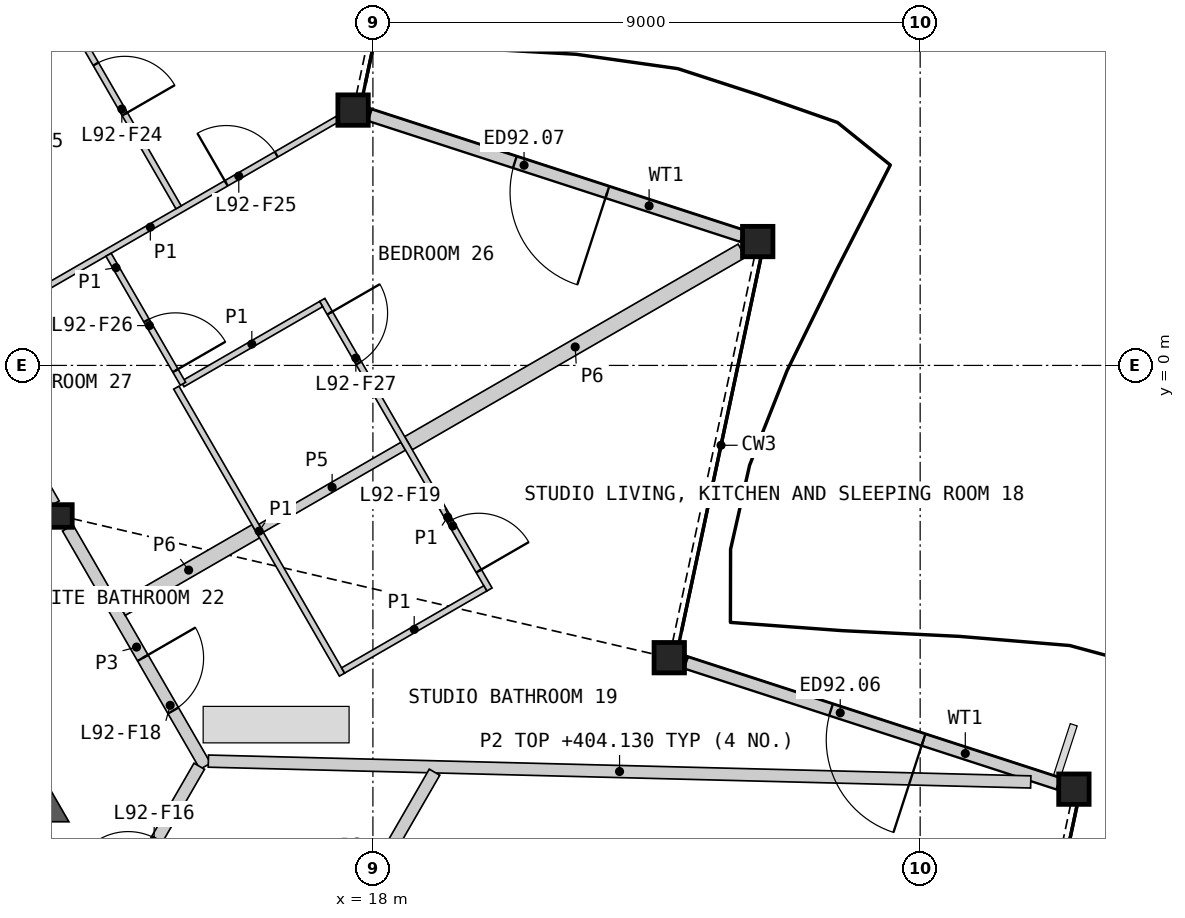
"""IFC4 building model, lengths in metres.
Left out: names, types, materials, properties, quantities, classifications, styles, units other than length and angle.
Written with IfcOpenShell. Run it as: python <this file> out.ifc"""

import sys

from ifc_helpers import new_model, si_unit, direction, frame, frame_2d, origin, origin_2d, place, context, subcontext, project, spatial, polyline, rectangle, hollow_rectangle, i_section, outline, extrude, element, fill, save


model = new_model("IFC4")
c1 = context("Model", 3, precision=1e-05, world=origin(), true_north=direction((0.0, 1.0)))
c2 = subcontext(c1, "Body", "Model", "MODEL_VIEW")
j1 = project(units=[si_unit("LENGTHUNIT", "METRE"), si_unit("PLANEANGLEUNIT", "RADIAN")], contexts=[c1])
p1 = place(None, origin())
s1 = spatial("IfcSite", under=j1, at=p1, CompositionType="ELEMENT")
p2 = place(p1, origin())
s2 = spatial("IfcBuilding", under=s1, at=p2, CompositionType="ELEMENT")
p3 = place(p2, frame((0.0, 0.0, 401.8)))
s3 = spatial("IfcBuildingStorey", under=s2, at=p3, CompositionType="ELEMENT", Elevation=401.8)
for number, where, z_axis, x_axis in (
    (1, (29.529, -6.969, 0.0), (0.0, 0.0, 1.0), (1.0, 0.0, 0.0)),
    (2, (22.874, -4.807, 0.0), (0.0, 0.0, 1.0), (1.0, 0.0, 0.0)),
    (3, (24.329, 2.037, 0.0), (0.0, 0.0, 1.0), (1.0, 0.0, 0.0)),
    (4, (17.674, 4.199, 0.0), (0.0, 0.0, 1.0), (1.0, 0.0, 0.0)),
):
    element("IfcColumn", number, at=place(p3, frame(where, z_axis=z_axis, x_axis=x_axis)), inside=s3, PredefinedType="COLUMN", context=c2, shape_type="SweptSolid", body=[
        extrude(hollow_rectangle(XDim=0.5, YDim=0.5, WallThickness=0.03, at=origin_2d()), origin(), (0.0, 0.0, 1.0), 3.4),
    ])
p4 = place(p3, frame((12.868, -2.476, 0.0), z_axis=(0.0, 0.0, 1.0), x_axis=(1.0, 0.0, 0.0)))
e5 = element("IfcColumn", 5, at=p4, inside=s3, PredefinedType="COLUMN", context=c2, shape_type="SweptSolid", body=[
    extrude(i_section(OverallWidth=0.374, OverallDepth=0.372, WebThickness=0.016, FlangeThickness=0.026, at=origin_2d()), origin(), (0.0, 0.0, 1.0), 3.4),
])
p5 = place(p3, frame((29.274, -6.88, 0.0), z_axis=(0.0, 0.0, 1.0), x_axis=(-0.951055516513, 0.309020071371, 0.0)))
e6 = element("IfcWall", 6, at=p5, inside=s3, PredefinedType="SOLIDWALL", context=c2, shape_type="SweptSolid", body=[
    extrude(rectangle(XDim=6.44, YDim=0.2, at=frame_2d((3.22, 0.0))), origin(), (0.0, 0.0, 1.0), 2.634),
])
p6 = place(p5, frame((2.333, 0.0, 0.0)))
e7 = element("IfcOpeningElement", 7, at=p6, cuts=e6, PredefinedType="OPENING", context=c2, shape_type="SweptSolid", body=[
    extrude(rectangle(XDim=1.6, YDim=2.25, at=frame_2d((0.8, 1.125))), frame((0.0, 0.11, 0.0), z_axis=(0.0, -1.0, 0.0), x_axis=(1.0, 0.0, 0.0)), (0.0, 0.0, 1.0), 0.22),
])
p7 = place(p3, frame((24.074, 2.127, 0.0), z_axis=(0.0, 0.0, 1.0), x_axis=(-0.951055516513, 0.309020071371, 0.0)))
e8 = element("IfcWall", 8, at=p7, inside=s3, PredefinedType="SOLIDWALL", context=c2, shape_type="SweptSolid", body=[
    extrude(rectangle(XDim=6.44, YDim=0.2, at=frame_2d((3.22, 0.0))), origin(), (0.0, 0.0, 1.0), 2.634),
])
p8 = place(p7, frame((2.333, 0.0, 0.0)))
e9 = element("IfcOpeningElement", 9, at=p8, cuts=e8, PredefinedType="OPENING", context=c2, shape_type="SweptSolid", body=[
    extrude(rectangle(XDim=1.6, YDim=2.25, at=frame_2d((0.8, 1.125))), frame((0.0, 0.11, 0.0), z_axis=(0.0, -1.0, 0.0), x_axis=(1.0, 0.0, 0.0)), (0.0, 0.0, 1.0), 0.22),
])
p9 = place(p3, origin())
e10 = element("IfcWall", 10, at=p9, inside=s3, PredefinedType="SHEAR", context=c2, shape_type="SweptSolid", body=[
    extrude(outline(polyline([(11.961, -7.506), (11.961, -6.906), (12.48, -6.606), (13.0, -7.506), (11.961, -7.506)])), origin(), (0.0, 0.0, 1.0), 3.1),
])
p10 = place(p3, frame((8.692, 4.756, 0.0), z_axis=(0.0, 0.0, 1.0), x_axis=(0.500001682468, -0.866024432409, 0.0)))
e11 = element("IfcWall", 11, at=p10, inside=s3, PredefinedType="PARTITIONING", context=c2, shape_type="SweptSolid", body=[
    extrude(rectangle(XDim=8.124, YDim=0.2, at=frame_2d((4.062, 0.0))), origin(), (0.0, 0.0, 1.0), 3.1),
])
p11 = place(p3, frame((18.585, -1.279, 0.0), z_axis=(0.0, 0.0, 1.0), x_axis=(0.866023139795, 0.500003921324, 0.0)))
e12 = element("IfcWall", 12, at=p11, inside=s3, PredefinedType="PARTITIONING", context=c2, shape_type="SweptSolid", body=[
    extrude(rectangle(XDim=6.332, YDim=0.25, at=frame_2d((3.166, 0.0))), origin(), (0.0, 0.0, 1.0), 2.33),
])
p12 = place(p3, frame((12.981, -2.673, 0.0), z_axis=(0.0, 0.0, 1.0), x_axis=(0.499974648164, -0.866040040179, 0.0)))
e13 = element("IfcWall", 13, at=p12, inside=s3, PredefinedType="PARTITIONING", context=c2, shape_type="SweptSolid", body=[
    extrude(rectangle(XDim=4.525, YDim=0.2, at=frame_2d((2.263, 0.0))), origin(), (0.0, 0.0, 1.0), 3.1),
])
p13 = place(p12, frame((2.468, 0.0, 0.0)))
e14 = element("IfcOpeningElement", 14, at=p13, cuts=e13, PredefinedType="OPENING", context=c2, shape_type="SweptSolid", body=[
    extrude(rectangle(XDim=1.0, YDim=2.1, at=frame_2d((0.5, 1.05))), frame((0.0, 0.11, 0.0), z_axis=(0.0, -1.0, 0.0), x_axis=(1.0, 0.0, 0.0)), (0.0, 0.0, 1.0), 0.22),
])
p14 = place(p3, frame((13.281, -9.819, 0.0), z_axis=(0.0, 0.0, 1.0), x_axis=(0.499958791762, 0.866049194065, 0.0)))
e15 = element("IfcWall", 15, at=p14, inside=s3, PredefinedType="PARTITIONING", context=c2, shape_type="SweptSolid", body=[
    extrude(rectangle(XDim=3.726, YDim=0.2, at=frame_2d((1.863, 0.0))), origin(), (0.0, 0.0, 1.0), 3.1),
])
p15 = place(p14, frame((1.388, 0.0, 0.0)))
e16 = element("IfcOpeningElement", 16, at=p15, cuts=e15, PredefinedType="OPENING", context=c2, shape_type="SweptSolid", body=[
    extrude(rectangle(XDim=0.95, YDim=2.1, at=frame_2d((0.475, 1.05))), frame((0.0, 0.11, 0.0), z_axis=(0.0, -1.0, 0.0), x_axis=(1.0, 0.0, 0.0)), (0.0, 0.0, 1.0), 0.22),
])
p16 = place(p3, frame((13.865, -4.004, 0.0), z_axis=(0.0, 0.0, 1.0), x_axis=(0.866054858364, 0.499948979701, 0.0)))
e17 = element("IfcWall", 17, at=p16, inside=s3, PredefinedType="PARTITIONING", context=c2, shape_type="SweptSolid", body=[
    extrude(rectangle(XDim=2.55, YDim=0.25, at=frame_2d((1.275, 0.0))), origin(), (0.0, 0.0, 1.0), 2.33),
])
p17 = place(p3, frame((15.294, -6.508, 0.0), z_axis=(0.0, 0.0, 1.0), x_axis=(0.999679467074, -0.02531724927, 0.0)))
e18 = element("IfcWall", 18, at=p17, inside=s3, PredefinedType="PARTITIONING", context=c2, shape_type="SweptSolid", body=[
    extrude(rectangle(XDim=13.53, YDim=0.2, at=frame_2d((6.765, 0.0))), origin(), (0.0, 0.0, 1.0), 2.33),
])
p18 = place(p3, frame((17.271, -9.708, 0.0), z_axis=(0.0, 0.0, 1.0), x_axis=(0.500011485685, 0.866018772419, 0.0)))
e19 = element("IfcWall", 19, at=p18, inside=s3, PredefinedType="PARTITIONING", context=c2, shape_type="SweptSolid", body=[
    extrude(rectangle(XDim=3.485, YDim=0.2, at=frame_2d((1.743, 0.0))), origin(), (0.0, 0.0, 1.0), 2.33),
])
p19 = place(p3, frame((16.16, -2.679, 0.0), z_axis=(0.0, 0.0, 1.0), x_axis=(0.866019956843, 0.50000943426, 0.0)))
e20 = element("IfcWall", 20, at=p19, inside=s3, PredefinedType="PLUMBINGWALL", context=c2, shape_type="SweptSolid", body=[
    extrude(rectangle(XDim=2.7, YDim=0.15, at=frame_2d((1.35, 0.0))), origin(), (0.0, 0.0, 1.0), 2.33),
])
p20 = place(p3, frame((8.775, 5.066, 0.0), z_axis=(0.0, 0.0, 1.0), x_axis=(0.866023724155, 0.500002909193, 0.0)))
e21 = element("IfcWall", 21, at=p20, inside=s3, PredefinedType="PARTITIONING", context=c2, shape_type="SweptSolid", body=[
    extrude(rectangle(XDim=11.655, YDim=0.1, at=frame_2d((5.827, 0.0))), origin(), (0.0, 0.0, 1.0), 2.33),
])
p21 = place(p20, frame((4.252, 0.0, 0.0)))
e22 = element("IfcOpeningElement", 22, at=p21, cuts=e21, PredefinedType="OPENING", context=c2, shape_type="SweptSolid", body=[
    extrude(rectangle(XDim=0.95, YDim=2.1, at=frame_2d((0.475, 1.05))), frame((0.0, 0.06, 0.0), z_axis=(0.0, -1.0, 0.0), x_axis=(1.0, 0.0, 0.0)), (0.0, 0.0, 1.0), 0.12),
])
p22 = place(p3, frame((11.265, 0.5, 0.0), z_axis=(0.0, 0.0, 1.0), x_axis=(0.866033839264, 0.499985389037, 0.0)))
e23 = element("IfcWall", 23, at=p22, inside=s3, PredefinedType="PARTITIONING", context=c2, shape_type="SweptSolid", body=[
    extrude(rectangle(XDim=7.1, YDim=0.1, at=frame_2d((3.55, 0.0))), origin(), (0.0, 0.0, 1.0), 2.33),
])
p23 = place(p22, frame((4.992, 0.0, 0.0)))
e24 = element("IfcOpeningElement", 24, at=p23, cuts=e23, PredefinedType="OPENING", context=c2, shape_type="SweptSolid", body=[
    extrude(rectangle(XDim=0.95, YDim=2.1, at=frame_2d((0.475, 1.05))), frame((0.0, 0.06, 0.0), z_axis=(0.0, -1.0, 0.0), x_axis=(1.0, 0.0, 0.0)), (0.0, 0.0, 1.0), 0.12),
])
p24 = place(p3, frame((14.767, -0.365, 0.0), z_axis=(0.0, 0.0, 1.0), x_axis=(0.500002931134, -0.866023711487, 0.0)))
e25 = element("IfcWall", 25, at=p24, inside=s3, PredefinedType="PARTITIONING", context=c2, shape_type="SweptSolid", body=[
    extrude(rectangle(XDim=5.45, YDim=0.1, at=frame_2d((2.725, 0.0))), origin(), (0.0, 0.0, 1.0), 2.33),
])
p25 = place(p3, frame((17.167, 1.078, 0.0), z_axis=(0.0, 0.0, 1.0), x_axis=(0.499996545922, -0.866027397988, 0.0)))
e26 = element("IfcWall", 26, at=p25, inside=s3, PredefinedType="PARTITIONING", context=c2, shape_type="SweptSolid", body=[
    extrude(rectangle(XDim=5.5, YDim=0.1, at=frame_2d((2.75, 0.0))), origin(), (0.0, 0.0, 1.0), 2.33),
])
p26 = place(p25, frame((4.199, 0.0, 0.0)))
e27 = element("IfcOpeningElement", 27, at=p26, cuts=e26, PredefinedType="OPENING", context=c2, shape_type="SweptSolid", body=[
    extrude(rectangle(XDim=0.95, YDim=2.1, at=frame_2d((0.475, 1.05))), frame((0.0, 0.06, 0.0), z_axis=(0.0, -1.0, 0.0), x_axis=(1.0, 0.0, 0.0)), (0.0, 0.0, 1.0), 0.12),
])
p27 = place(p25, frame((0.25, 0.0, 0.0)))
e28 = element("IfcOpeningElement", 28, at=p27, cuts=e26, PredefinedType="OPENING", context=c2, shape_type="SweptSolid", body=[
    extrude(rectangle(XDim=0.95, YDim=2.1, at=frame_2d((0.475, 1.05))), frame((0.0, 0.06, 0.0), z_axis=(0.0, -1.0, 0.0), x_axis=(1.0, 0.0, 0.0)), (0.0, 0.0, 1.0), 0.12),
])
p28 = place(p3, frame((12.254, 7.017, 0.0), z_axis=(0.0, 0.0, 1.0), x_axis=(0.500005610874, -0.86602216432, 0.0)))
e29 = element("IfcWall", 29, at=p28, inside=s3, PredefinedType="PARTITIONING", context=c2, shape_type="SweptSolid", body=[
    extrude(rectangle(XDim=5.1, YDim=0.1, at=frame_2d((2.55, 0.0))), origin(), (0.0, 0.0, 1.0), 2.33),
])
p29 = place(p28, frame((2.379, 0.0, 0.0)))
e30 = element("IfcOpeningElement", 30, at=p29, cuts=e29, PredefinedType="OPENING", context=c2, shape_type="SweptSolid", body=[
    extrude(rectangle(XDim=0.95, YDim=2.1, at=frame_2d((0.475, 1.05))), frame((0.0, 0.06, 0.0), z_axis=(0.0, -1.0, 0.0), x_axis=(1.0, 0.0, 0.0)), (0.0, 0.0, 1.0), 0.12),
])
p30 = place(p3, frame((17.51, -5.017, 0.0), z_axis=(0.0, 0.0, 1.0), x_axis=(0.866059108428, 0.4999416173, 0.0)))
e31 = element("IfcWall", 31, at=p30, inside=s3, PredefinedType="PARTITIONING", context=c2, shape_type="SweptSolid", body=[
    extrude(rectangle(XDim=2.7, YDim=0.1, at=frame_2d((1.35, 0.0))), origin(), (0.0, 0.0, 1.0), 2.33),
])
p31 = place(p3, frame((14.868, -0.307, 0.0), z_axis=(0.0, 0.0, 1.0), x_axis=(0.865997164422, 0.50004890882, 0.0)))
e32 = element("IfcWall", 32, at=p31, inside=s3, PredefinedType="PARTITIONING", context=c2, shape_type="SweptSolid", body=[
    extrude(rectangle(XDim=2.633, YDim=0.1, at=frame_2d((1.316, 0.0))), origin(), (0.0, 0.0, 1.0), 2.33),
])
p32 = place(p3, frame((13.652, 1.82, 0.0), z_axis=(0.0, 0.0, 1.0), x_axis=(0.500018594424, -0.866014668023, 0.0)))
e33 = element("IfcWall", 33, at=p32, inside=s3, PredefinedType="PARTITIONING", context=c2, shape_type="SweptSolid", body=[
    extrude(rectangle(XDim=2.45, YDim=0.1, at=frame_2d((1.225, 0.0))), origin(), (0.0, 0.0, 1.0), 2.33),
])
p33 = place(p32, frame((1.25, 0.0, 0.0)))
e34 = element("IfcOpeningElement", 34, at=p33, cuts=e33, PredefinedType="OPENING", context=c2, shape_type="SweptSolid", body=[
    extrude(rectangle(XDim=0.95, YDim=2.1, at=frame_2d((0.475, 1.05))), frame((0.0, 0.06, 0.0), z_axis=(0.0, -1.0, 0.0), x_axis=(1.0, 0.0, 0.0)), (0.0, 0.0, 1.0), 0.12),
])
p34 = place(p6, origin())
e35 = element("IfcDoor", 35, at=p34, inside=s3, OperationType="DOUBLE_DOOR_SINGLE_SWING", PredefinedType="DOOR", context=c2, shape_type="SweptSolid", body=[
    extrude(rectangle(XDim=1.6, YDim=2.25, at=frame_2d((0.8, 1.125))), frame((0.0, 0.025, 0.0), z_axis=(0.0, -1.0, 0.0), x_axis=(1.0, 0.0, 0.0)), (0.0, 0.0, 1.0), 0.05),
])
fill(e7, e35)
p35 = place(p8, origin())
e36 = element("IfcDoor", 36, at=p35, inside=s3, OperationType="DOUBLE_DOOR_SINGLE_SWING", PredefinedType="DOOR", context=c2, shape_type="SweptSolid", body=[
    extrude(rectangle(XDim=1.6, YDim=2.25, at=frame_2d((0.8, 1.125))), frame((0.0, 0.025, 0.0), z_axis=(0.0, -1.0, 0.0), x_axis=(1.0, 0.0, 0.0)), (0.0, 0.0, 1.0), 0.05),
])
fill(e9, e36)
p36 = place(p13, origin())
e37 = element("IfcDoor", 37, at=p36, inside=s3, OperationType="SINGLE_SWING_LEFT", PredefinedType="DOOR", context=c2, shape_type="SweptSolid", body=[
    extrude(rectangle(XDim=1.0, YDim=2.1, at=frame_2d((0.5, 1.05))), frame((0.0, 0.025, 0.0), z_axis=(0.0, -1.0, 0.0), x_axis=(1.0, 0.0, 0.0)), (0.0, 0.0, 1.0), 0.05),
])
fill(e14, e37)
p37 = place(p26, origin())
e38 = element("IfcDoor", 38, at=p37, inside=s3, OperationType="SINGLE_SWING_RIGHT", PredefinedType="DOOR", context=c2, shape_type="SweptSolid", body=[
    extrude(rectangle(XDim=0.95, YDim=2.1, at=frame_2d((0.475, 1.05))), frame((0.0, 0.025, 0.0), z_axis=(0.0, -1.0, 0.0), x_axis=(1.0, 0.0, 0.0)), (0.0, 0.0, 1.0), 0.05),
])
fill(e27, e38)
p38 = place(p29, origin())
e39 = element("IfcDoor", 39, at=p38, inside=s3, OperationType="SINGLE_SWING_RIGHT", PredefinedType="DOOR", context=c2, shape_type="SweptSolid", body=[
    extrude(rectangle(XDim=0.95, YDim=2.1, at=frame_2d((0.475, 1.05))), frame((0.0, 0.025, 0.0), z_axis=(0.0, -1.0, 0.0), x_axis=(1.0, 0.0, 0.0)), (0.0, 0.0, 1.0), 0.05),
])
fill(e30, e39)
p39 = place(p23, origin())
e40 = element("IfcDoor", 40, at=p39, inside=s3, OperationType="SINGLE_SWING_LEFT", PredefinedType="DOOR", context=c2, shape_type="SweptSolid", body=[
    extrude(rectangle(XDim=0.95, YDim=2.1, at=frame_2d((0.475, 1.05))), frame((0.0, 0.025, 0.0), z_axis=(0.0, -1.0, 0.0), x_axis=(1.0, 0.0, 0.0)), (0.0, 0.0, 1.0), 0.05),
])
fill(e24, e40)
p40 = place(p33, origin())
e41 = element("IfcDoor", 41, at=p40, inside=s3, OperationType="SINGLE_SWING_RIGHT", PredefinedType="DOOR", context=c2, shape_type="SweptSolid", body=[
    extrude(rectangle(XDim=0.95, YDim=2.1, at=frame_2d((0.475, 1.05))), frame((0.0, 0.025, 0.0), z_axis=(0.0, -1.0, 0.0), x_axis=(1.0, 0.0, 0.0)), (0.0, 0.0, 1.0), 0.05),
])
fill(e34, e41)
p41 = place(p27, origin())
e42 = element("IfcDoor", 42, at=p41, inside=s3, OperationType="SINGLE_SWING_LEFT", PredefinedType="DOOR", context=c2, shape_type="SweptSolid", body=[
    extrude(rectangle(XDim=0.95, YDim=2.1, at=frame_2d((0.475, 1.05))), frame((0.0, 0.025, 0.0), z_axis=(0.0, -1.0, 0.0), x_axis=(1.0, 0.0, 0.0)), (0.0, 0.0, 1.0), 0.05),
])
fill(e28, e42)
save(model, sys.argv[1])
